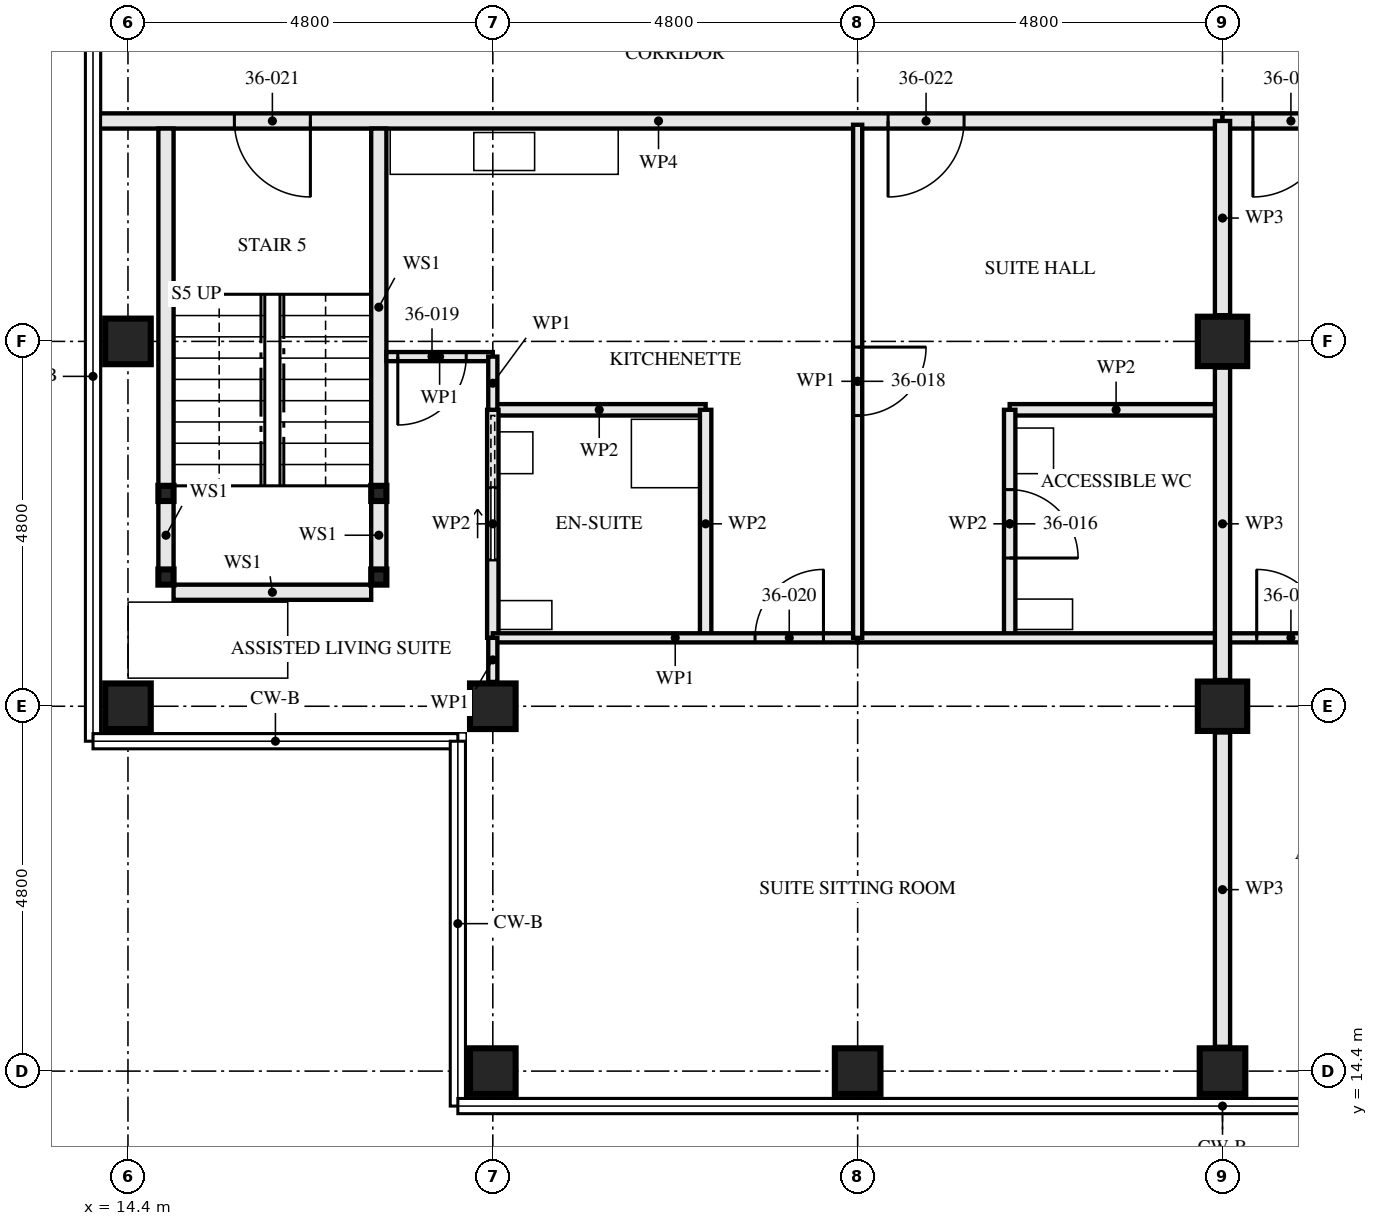
"""IFC4 building model, lengths in metres.
Left out: names, types, materials, properties, quantities, classifications, styles, units other than length and angle.
Written with IfcOpenShell. Run it as: python <this file> out.ifc"""

import sys

from ifc_helpers import new_model, si_unit, direction, frame, frame_2d, origin, origin_2d, place, context, subcontext, project, spatial, rectangle, hollow_rectangle, extrude, element, fill, save


model = new_model("IFC4")
c1 = context("Model", 3, precision=1e-05, world=origin(), true_north=direction((0.0, 1.0)))
c2 = subcontext(c1, "Body", "Model", "MODEL_VIEW")
j1 = project(units=[si_unit("LENGTHUNIT", "METRE"), si_unit("PLANEANGLEUNIT", "RADIAN")], contexts=[c1])
p1 = place(None, origin())
s1 = spatial("IfcSite", under=j1, at=p1, CompositionType="ELEMENT")
p2 = place(p1, origin())
s2 = spatial("IfcBuilding", under=s1, at=p2, CompositionType="ELEMENT")
p3 = place(p2, frame((0.0, 0.0, 133.0)))
s3 = spatial("IfcBuildingStorey", under=s2, at=p3, CompositionType="ELEMENT", Elevation=133.0)
for number, where, z_axis, x_axis in (
    (1, (14.4, 19.2, 0.0), (0.0, 0.0, 1.0), (0.0, 1.0, 0.0)),
    (2, (14.4, 24.0, 0.0), (0.0, 0.0, 1.0), (1.0, 0.0, 0.0)),
    (3, (19.2, 14.4, 0.0), (0.0, 0.0, 1.0), (0.0, 1.0, 0.0)),
    (4, (19.2, 19.2, 0.0), (0.0, 0.0, 1.0), (0.0, 1.0, 0.0)),
    (5, (24.0, 14.4, 0.0), (0.0, 0.0, 1.0), (0.0, 1.0, 0.0)),
    (6, (28.8, 14.4, 0.0), (0.0, 0.0, 1.0), (0.0, 1.0, 0.0)),
):
    element("IfcColumn", number, at=place(p3, frame(where, z_axis=z_axis, x_axis=x_axis)), inside=s3, PredefinedType="COLUMN", context=c2, shape_type="SweptSolid", body=[
        extrude(hollow_rectangle(XDim=0.6, YDim=0.6, WallThickness=0.08, at=origin_2d()), origin(), (0.0, 0.0, 1.0), 3.5),
    ])
for number, where, z_axis, x_axis in (
    (7, (28.8, 19.2, 0.0), (0.0, 0.0, 1.0), (1.0, 0.0, 0.0)),
    (8, (28.8, 24.0, 0.0), (0.0, 0.0, 1.0), (1.0, 0.0, 0.0)),
):
    element("IfcColumn", number, at=place(p3, frame(where, z_axis=z_axis, x_axis=x_axis)), inside=s3, PredefinedType="COLUMN", context=c2, shape_type="SweptSolid", body=[
        extrude(hollow_rectangle(XDim=0.65, YDim=0.65, WallThickness=0.05, at=origin_2d()), origin(), (0.0, 0.0, 1.0), 3.5),
    ])
for number, where, z_axis, x_axis in (
    (9, (14.9, 20.9, 0.0), (0.0, 0.0, 1.0), (1.0, 0.0, 0.0)),
    (10, (17.7, 20.9, 0.0), (0.0, 0.0, 1.0), (1.0, 0.0, 0.0)),
    (11, (14.9, 22.0, 0.0), (0.0, 0.0, 1.0), (1.0, 0.0, 0.0)),
    (12, (17.7, 22.0, 0.0), (0.0, 0.0, 1.0), (1.0, 0.0, 0.0)),
):
    element("IfcColumn", number, at=place(p3, frame(where, z_axis=z_axis, x_axis=x_axis)), inside=s3, PredefinedType="COLUMN", context=c2, shape_type="SweptSolid", body=[
        extrude(hollow_rectangle(XDim=0.2, YDim=0.2, WallThickness=0.008, at=origin_2d()), origin(), (0.0, 0.0, 1.0), 3.25),
    ])
p4 = place(p3, frame((14.9, 21.0, 0.0), z_axis=(0.0, 0.0, 1.0), x_axis=(0.0, 1.0, 0.0)))
e13 = element("IfcWall", 13, at=p4, inside=s3, PredefinedType="SOLIDWALL", context=c2, shape_type="SweptSolid", body=[
    extrude(rectangle(XDim=0.9, YDim=0.2, at=frame_2d((0.45, 0.0))), origin(), (0.0, 0.0, 1.0), 2.94),
])
p5 = place(p3, frame((14.9, 22.1, 0.0), z_axis=(0.0, 0.0, 1.0), x_axis=(0.0, 1.0, 0.0)))
e14 = element("IfcWall", 14, at=p5, inside=s3, PredefinedType="SOLIDWALL", context=c2, shape_type="SweptSolid", body=[
    extrude(rectangle(XDim=4.7, YDim=0.2, at=frame_2d((2.35, 0.0))), origin(), (0.0, 0.0, 1.0), 2.94),
])
p6 = place(p3, frame((17.7, 21.0, 0.0), z_axis=(0.0, 0.0, 1.0), x_axis=(0.0, 1.0, 0.0)))
e15 = element("IfcWall", 15, at=p6, inside=s3, PredefinedType="SOLIDWALL", context=c2, shape_type="SweptSolid", body=[
    extrude(rectangle(XDim=0.9, YDim=0.2, at=frame_2d((0.45, 0.0))), origin(), (0.0, 0.0, 1.0), 2.94),
])
p7 = place(p3, frame((17.7, 22.1, 0.0), z_axis=(0.0, 0.0, 1.0), x_axis=(0.0, 1.0, 0.0)))
e16 = element("IfcWall", 16, at=p7, inside=s3, PredefinedType="SOLIDWALL", context=c2, shape_type="SweptSolid", body=[
    extrude(rectangle(XDim=4.7, YDim=0.2, at=frame_2d((2.35, 0.0))), origin(), (0.0, 0.0, 1.0), 2.94),
])
p8 = place(p3, frame((15.0, 20.7, 0.0), z_axis=(0.0, 0.0, 1.0), x_axis=(1.0, 0.0, 0.0)))
e17 = element("IfcWall", 17, at=p8, inside=s3, PredefinedType="SOLIDWALL", context=c2, shape_type="SweptSolid", body=[
    extrude(rectangle(XDim=2.6, YDim=0.2, at=frame_2d((1.3, 0.0))), origin(), (0.0, 0.0, 1.0), 3.25),
])
p9 = place(p3, frame((26.0, 20.1, 0.0), z_axis=(0.0, 0.0, 1.0), x_axis=(0.0, 1.0, 0.0)))
e18 = element("IfcWall", 18, at=p9, inside=s3, PredefinedType="PARTITIONING", context=c2, shape_type="SweptSolid", body=[
    extrude(rectangle(XDim=3.0, YDim=0.15, at=frame_2d((1.5, 0.0))), origin(), (0.0, 0.0, 1.0), 3.25),
])
p10 = place(p9, frame((1.05, 0.0, 0.0)))
e19 = element("IfcOpeningElement", 19, at=p10, cuts=e18, PredefinedType="OPENING", context=c2, shape_type="SweptSolid", body=[
    extrude(rectangle(XDim=0.9, YDim=2.1, at=frame_2d((0.45, 1.05))), frame((0.0, 0.085, 0.0), z_axis=(0.0, -1.0, 0.0), x_axis=(1.0, 0.0, 0.0)), (0.0, 0.0, 1.0), 0.171),
])
p11 = place(p3, frame((26.0, 23.1, 0.0), z_axis=(0.0, 0.0, 1.0), x_axis=(1.0, 0.0, 0.0)))
e20 = element("IfcWall", 20, at=p11, inside=s3, PredefinedType="PARTITIONING", context=c2, shape_type="SweptSolid", body=[
    extrude(rectangle(XDim=2.8, YDim=0.15, at=frame_2d((1.4, 0.0))), origin(), (0.0, 0.0, 1.0), 3.25),
])
p12 = place(p3, frame((19.2, 20.1, 0.0), z_axis=(0.0, 0.0, 1.0), x_axis=(0.0, 1.0, 0.0)))
e21 = element("IfcWall", 21, at=p12, inside=s3, PredefinedType="PARTITIONING", context=c2, shape_type="SweptSolid", body=[
    extrude(rectangle(XDim=3.0, YDim=0.15, at=frame_2d((1.5, 0.0))), origin(), (0.0, 0.0, 1.0), 2.04),
])
p13 = place(p12, frame((1.025, 0.0, 0.0)))
e22 = element("IfcOpeningElement", 22, at=p13, cuts=e21, PredefinedType="OPENING", context=c2, shape_type="SweptSolid", body=[
    extrude(rectangle(XDim=0.95, YDim=2.0, at=frame_2d((0.475, 1.0))), frame((0.0, 0.085, 0.0), z_axis=(0.0, -1.0, 0.0), x_axis=(1.0, 0.0, 0.0)), (0.0, 0.0, 1.0), 0.171),
])
p14 = place(p3, frame((22.0, 20.1, 0.0), z_axis=(0.0, 0.0, 1.0), x_axis=(0.0, 1.0, 0.0)))
e23 = element("IfcWall", 23, at=p14, inside=s3, PredefinedType="PARTITIONING", context=c2, shape_type="SweptSolid", body=[
    extrude(rectangle(XDim=3.0, YDim=0.15, at=frame_2d((1.5, 0.0))), origin(), (0.0, 0.0, 1.0), 3.25),
])
p15 = place(p3, frame((19.2, 23.1, 0.0), z_axis=(0.0, 0.0, 1.0), x_axis=(1.0, 0.0, 0.0)))
e24 = element("IfcWall", 24, at=p15, inside=s3, PredefinedType="PARTITIONING", context=c2, shape_type="SweptSolid", body=[
    extrude(rectangle(XDim=2.8, YDim=0.15, at=frame_2d((1.4, 0.0))), origin(), (0.0, 0.0, 1.0), 3.25),
])
p16 = place(p3, frame((24.0, 20.1, 0.0), z_axis=(0.0, 0.0, 1.0), x_axis=(0.0, 1.0, 0.0)))
e25 = element("IfcWall", 25, at=p16, inside=s3, PredefinedType="PARTITIONING", context=c2, shape_type="SweptSolid", body=[
    extrude(rectangle(XDim=6.75, YDim=0.12, at=frame_2d((3.375, 0.0))), origin(), (0.0, 0.0, 1.0), 2.04),
])
p17 = place(p16, frame((2.925, 0.0, 0.0)))
e26 = element("IfcOpeningElement", 26, at=p17, cuts=e25, PredefinedType="OPENING", context=c2, shape_type="SweptSolid", body=[
    extrude(rectangle(XDim=0.9, YDim=2.0, at=frame_2d((0.45, 1.0))), frame((0.0, 0.071, 0.0), z_axis=(0.0, -1.0, 0.0), x_axis=(1.0, 0.0, 0.0)), (0.0, 0.0, 1.0), 0.141),
])
p18 = place(p3, frame((17.8, 23.8, 0.0), z_axis=(0.0, 0.0, 1.0), x_axis=(1.0, 0.0, 0.0)))
e27 = element("IfcWall", 27, at=p18, inside=s3, PredefinedType="PARTITIONING", context=c2, shape_type="SweptSolid", body=[
    extrude(rectangle(XDim=1.4, YDim=0.12, at=frame_2d((0.7, 0.0))), origin(), (0.0, 0.0, 1.0), 3.25),
])
p19 = place(p18, frame((0.15, 0.0, 0.0)))
e28 = element("IfcOpeningElement", 28, at=p19, cuts=e27, PredefinedType="OPENING", context=c2, shape_type="SweptSolid", body=[
    extrude(rectangle(XDim=0.9, YDim=2.1, at=frame_2d((0.45, 1.05))), frame((0.0, 0.071, 0.0), z_axis=(0.0, -1.0, 0.0), x_axis=(1.0, 0.0, 0.0)), (0.0, 0.0, 1.0), 0.141),
])
p20 = place(p3, frame((19.2, 20.1, 0.0), z_axis=(0.0, 0.0, 1.0), x_axis=(1.0, 0.0, 0.0)))
e29 = element("IfcWall", 29, at=p20, inside=s3, PredefinedType="PARTITIONING", context=c2, shape_type="SweptSolid", body=[
    extrude(rectangle(XDim=4.8, YDim=0.12, at=frame_2d((2.4, 0.0))), origin(), (0.0, 0.0, 1.0), 3.25),
])
p21 = place(p20, frame((3.45, 0.0, 0.0)))
e30 = element("IfcOpeningElement", 30, at=p21, cuts=e29, PredefinedType="OPENING", context=c2, shape_type="SweptSolid", body=[
    extrude(rectangle(XDim=0.9, YDim=2.1, at=frame_2d((0.45, 1.05))), frame((0.0, 0.071, 0.0), z_axis=(0.0, -1.0, 0.0), x_axis=(1.0, 0.0, 0.0)), (0.0, 0.0, 1.0), 0.141),
])
p22 = place(p3, frame((24.0, 20.1, 0.0), z_axis=(0.0, 0.0, 1.0), x_axis=(1.0, 0.0, 0.0)))
e31 = element("IfcWall", 31, at=p22, inside=s3, PredefinedType="PARTITIONING", context=c2, shape_type="SweptSolid", body=[
    extrude(rectangle(XDim=4.8, YDim=0.12, at=frame_2d((2.4, 0.0))), origin(), (0.0, 0.0, 1.0), 3.25),
])
p23 = place(p3, frame((19.2, 19.52, 0.0), z_axis=(0.0, 0.0, 1.0), x_axis=(0.0, 1.0, 0.0)))
e32 = element("IfcWall", 32, at=p23, inside=s3, PredefinedType="PARTITIONING", context=c2, shape_type="SweptSolid", body=[
    extrude(rectangle(XDim=0.58, YDim=0.12, at=frame_2d((0.29, 0.0))), origin(), (0.0, 0.0, 1.0), 2.04),
])
p24 = place(p3, frame((19.2, 23.1, 0.0), z_axis=(0.0, 0.0, 1.0), x_axis=(0.0, 1.0, 0.0)))
e33 = element("IfcWall", 33, at=p24, inside=s3, PredefinedType="PARTITIONING", context=c2, shape_type="SweptSolid", body=[
    extrude(rectangle(XDim=0.7, YDim=0.12, at=frame_2d((0.35, 0.0))), origin(), (0.0, 0.0, 1.0), 2.04),
])
p25 = place(p3, frame((13.96, 26.9, 0.0), z_axis=(0.0, 0.0, 1.0), x_axis=(1.0, 0.0, 0.0)))
e34 = element("IfcWall", 34, at=p25, inside=s3, PredefinedType="PARTITIONING", context=c2, shape_type="SweptSolid", body=[
    extrude(rectangle(XDim=14.84, YDim=0.2, at=frame_2d((7.42, 0.0))), origin(), (0.0, 0.0, 1.0), 2.04),
])
p26 = place(p25, frame((1.84, 0.0, 0.0)))
e35 = element("IfcOpeningElement", 35, at=p26, cuts=e34, PredefinedType="OPENING", context=c2, shape_type="SweptSolid", body=[
    extrude(rectangle(XDim=1.0, YDim=2.0, at=frame_2d((0.5, 1.0))), frame((0.0, 0.111, 0.0), z_axis=(0.0, -1.0, 0.0), x_axis=(1.0, 0.0, 0.0)), (0.0, 0.0, 1.0), 0.221),
])
p27 = place(p25, frame((10.44, 0.0, 0.0)))
e36 = element("IfcOpeningElement", 36, at=p27, cuts=e34, PredefinedType="OPENING", context=c2, shape_type="SweptSolid", body=[
    extrude(rectangle(XDim=1.0, YDim=2.0, at=frame_2d((0.5, 1.0))), frame((0.0, 0.111, 0.0), z_axis=(0.0, -1.0, 0.0), x_axis=(1.0, 0.0, 0.0)), (0.0, 0.0, 1.0), 0.221),
])
p28 = place(p3, frame((28.8, 20.1, 0.0), z_axis=(0.0, 0.0, 1.0), x_axis=(1.0, 0.0, 0.0)))
e37 = element("IfcWall", 37, at=p28, inside=s3, PredefinedType="PARTITIONING", context=c2, shape_type="SweptSolid", body=[
    extrude(rectangle(XDim=4.8, YDim=0.12, at=frame_2d((2.4, 0.0))), origin(), (0.0, 0.0, 1.0), 3.25),
])
p29 = place(p28, frame((0.45, 0.0, 0.0)))
e38 = element("IfcOpeningElement", 38, at=p29, cuts=e37, PredefinedType="OPENING", context=c2, shape_type="SweptSolid", body=[
    extrude(rectangle(XDim=0.9, YDim=2.1, at=frame_2d((0.45, 1.05))), frame((0.0, 0.071, 0.0), z_axis=(0.0, -1.0, 0.0), x_axis=(1.0, 0.0, 0.0)), (0.0, 0.0, 1.0), 0.141),
])
p30 = place(p28, frame((2.925, 0.0, 0.0)))
e39 = element("IfcOpeningElement", 39, at=p30, cuts=e37, PredefinedType="OPENING", context=c2, shape_type="SweptSolid", body=[
    extrude(rectangle(XDim=0.95, YDim=2.1, at=frame_2d((0.475, 1.05))), frame((0.0, 0.071, 0.0), z_axis=(0.0, -1.0, 0.0), x_axis=(1.0, 0.0, 0.0)), (0.0, 0.0, 1.0), 0.141),
])
p31 = place(p3, frame((28.8, 26.9, 0.0), z_axis=(0.0, 0.0, 1.0), x_axis=(1.0, 0.0, 0.0)))
e40 = element("IfcWall", 40, at=p31, inside=s3, PredefinedType="PARTITIONING", context=c2, shape_type="SweptSolid", body=[
    extrude(rectangle(XDim=9.6, YDim=0.2, at=frame_2d((4.8, 0.0))), origin(), (0.0, 0.0, 1.0), 3.25),
])
p32 = place(p31, frame((0.4, 0.0, 0.0)))
e41 = element("IfcOpeningElement", 41, at=p32, cuts=e40, PredefinedType="OPENING", context=c2, shape_type="SweptSolid", body=[
    extrude(rectangle(XDim=1.0, YDim=2.1, at=frame_2d((0.5, 1.05))), frame((0.0, 0.111, 0.0), z_axis=(0.0, -1.0, 0.0), x_axis=(1.0, 0.0, 0.0)), (0.0, 0.0, 1.0), 0.221),
])
p33 = place(p3, frame((28.8, 14.72, 0.0), z_axis=(0.0, 0.0, 1.0), x_axis=(0.0, 1.0, 0.0)))
e42 = element("IfcWall", 42, at=p33, inside=s3, PredefinedType="PARTITIONING", context=c2, shape_type="SweptSolid", body=[
    extrude(rectangle(XDim=4.135, YDim=0.2, at=frame_2d((2.067, 0.0))), origin(), (0.0, 0.0, 1.0), 2.04),
])
p34 = place(p3, frame((28.8, 19.545, 0.0), z_axis=(0.0, 0.0, 1.0), x_axis=(0.0, 1.0, 0.0)))
e43 = element("IfcWall", 43, at=p34, inside=s3, PredefinedType="PARTITIONING", context=c2, shape_type="SweptSolid", body=[
    extrude(rectangle(XDim=4.11, YDim=0.2, at=frame_2d((2.055, 0.0))), origin(), (0.0, 0.0, 1.0), 2.04),
])
p35 = place(p3, frame((28.8, 24.345, 0.0), z_axis=(0.0, 0.0, 1.0), x_axis=(0.0, 1.0, 0.0)))
e44 = element("IfcWall", 44, at=p35, inside=s3, PredefinedType="PARTITIONING", context=c2, shape_type="SweptSolid", body=[
    extrude(rectangle(XDim=2.555, YDim=0.2, at=frame_2d((1.277, 0.0))), origin(), (0.0, 0.0, 1.0), 2.04),
])
p36 = place(p10, frame((0.9, 0.0, 0.0), z_axis=(0.0, 0.0, 1.0), x_axis=(-1.0, 0.0, 0.0)))
e45 = element("IfcDoor", 45, at=p36, inside=s3, OperationType="SINGLE_SWING_LEFT", PredefinedType="DOOR", context=c2, shape_type="SweptSolid", body=[
    extrude(rectangle(XDim=0.9, YDim=2.1, at=frame_2d((0.45, 1.05))), frame((0.0, 0.022, 0.0), z_axis=(0.0, -1.0, 0.0), x_axis=(1.0, 0.0, 0.0)), (0.0, 0.0, 1.0), 0.044),
])
fill(e19, e45)
p37 = place(p13, origin())
e46 = element("IfcDoor", 46, at=p37, inside=s3, OperationType="SLIDING_TO_LEFT", PredefinedType="DOOR", context=c2, shape_type="SweptSolid", body=[
    extrude(rectangle(XDim=0.95, YDim=2.0, at=frame_2d((0.475, 1.0))), frame((0.0, 0.022, 0.0), z_axis=(0.0, -1.0, 0.0), x_axis=(1.0, 0.0, 0.0)), (0.0, 0.0, 1.0), 0.044),
])
fill(e22, e46)
p38 = place(p17, frame((0.9, 0.0, 0.0), z_axis=(0.0, 0.0, 1.0), x_axis=(-1.0, 0.0, 0.0)))
e47 = element("IfcDoor", 47, at=p38, inside=s3, OperationType="SINGLE_SWING_RIGHT", PredefinedType="DOOR", context=c2, shape_type="SweptSolid", body=[
    extrude(rectangle(XDim=0.9, YDim=2.0, at=frame_2d((0.45, 1.0))), frame((0.0, 0.022, 0.0), z_axis=(0.0, -1.0, 0.0), x_axis=(1.0, 0.0, 0.0)), (0.0, 0.0, 1.0), 0.044),
])
fill(e26, e47)
p39 = place(p19, frame((0.9, 0.0, 0.0), z_axis=(0.0, 0.0, 1.0), x_axis=(-1.0, 0.0, 0.0)))
e48 = element("IfcDoor", 48, at=p39, inside=s3, OperationType="SINGLE_SWING_LEFT", PredefinedType="DOOR", context=c2, shape_type="SweptSolid", body=[
    extrude(rectangle(XDim=0.9, YDim=2.1, at=frame_2d((0.45, 1.05))), frame((0.0, 0.022, 0.0), z_axis=(0.0, -1.0, 0.0), x_axis=(1.0, 0.0, 0.0)), (0.0, 0.0, 1.0), 0.044),
])
fill(e28, e48)
p40 = place(p21, origin())
e49 = element("IfcDoor", 49, at=p40, inside=s3, OperationType="SINGLE_SWING_LEFT", PredefinedType="DOOR", context=c2, shape_type="SweptSolid", body=[
    extrude(rectangle(XDim=0.9, YDim=2.1, at=frame_2d((0.45, 1.05))), frame((0.0, 0.022, 0.0), z_axis=(0.0, -1.0, 0.0), x_axis=(1.0, 0.0, 0.0)), (0.0, 0.0, 1.0), 0.044),
])
fill(e30, e49)
p41 = place(p26, frame((1.0, 0.0, 0.0), z_axis=(0.0, 0.0, 1.0), x_axis=(-1.0, 0.0, 0.0)))
e50 = element("IfcDoor", 50, at=p41, inside=s3, OperationType="SINGLE_SWING_RIGHT", PredefinedType="DOOR", context=c2, shape_type="SweptSolid", body=[
    extrude(rectangle(XDim=1.0, YDim=2.0, at=frame_2d((0.5, 1.0))), frame((0.0, 0.032, 0.0), z_axis=(0.0, -1.0, 0.0), x_axis=(1.0, 0.0, 0.0)), (0.0, 0.0, 1.0), 0.064),
])
fill(e35, e50)
p42 = place(p27, frame((1.0, 0.0, 0.0), z_axis=(0.0, 0.0, 1.0), x_axis=(-1.0, 0.0, 0.0)))
e51 = element("IfcDoor", 51, at=p42, inside=s3, OperationType="SINGLE_SWING_LEFT", PredefinedType="DOOR", context=c2, shape_type="SweptSolid", body=[
    extrude(rectangle(XDim=1.0, YDim=2.0, at=frame_2d((0.5, 1.0))), frame((0.0, 0.027, 0.0), z_axis=(0.0, -1.0, 0.0), x_axis=(1.0, 0.0, 0.0)), (0.0, 0.0, 1.0), 0.054),
])
fill(e36, e51)
p43 = place(p29, origin())
e52 = element("IfcDoor", 52, at=p43, inside=s3, OperationType="SINGLE_SWING_RIGHT", PredefinedType="DOOR", context=c2, shape_type="SweptSolid", body=[
    extrude(rectangle(XDim=0.9, YDim=2.1, at=frame_2d((0.45, 1.05))), frame((0.0, 0.022, 0.0), z_axis=(0.0, -1.0, 0.0), x_axis=(1.0, 0.0, 0.0)), (0.0, 0.0, 1.0), 0.044),
])
fill(e38, e52)
p44 = place(p32, frame((1.0, 0.0, 0.0), z_axis=(0.0, 0.0, 1.0), x_axis=(-1.0, 0.0, 0.0)))
e53 = element("IfcDoor", 53, at=p44, inside=s3, OperationType="SINGLE_SWING_LEFT", PredefinedType="DOOR", context=c2, shape_type="SweptSolid", body=[
    extrude(rectangle(XDim=1.0, YDim=2.1, at=frame_2d((0.5, 1.05))), frame((0.0, 0.027, 0.0), z_axis=(0.0, -1.0, 0.0), x_axis=(1.0, 0.0, 0.0)), (0.0, 0.0, 1.0), 0.054),
])
fill(e41, e53)
save(model, sys.argv[1])
